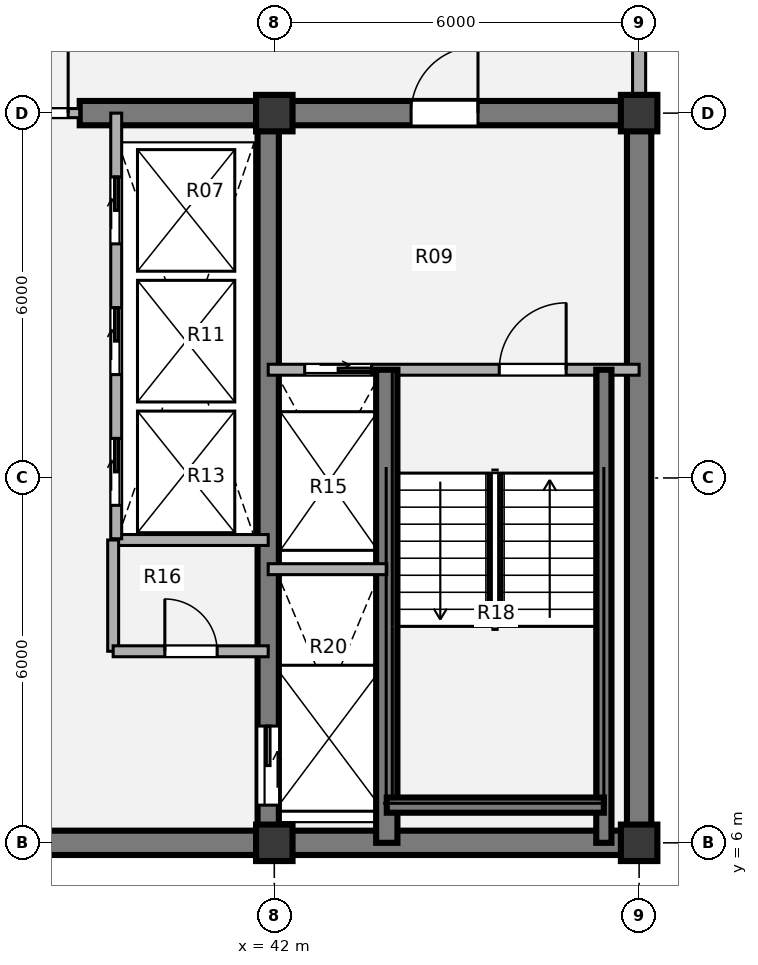
"""IFC4 building model, lengths in metres.
Left out: names, types, materials, properties, quantities, classifications, styles, units other than length and angle.
Written with IfcOpenShell. Run it as: python <this file> out.ifc"""

import sys

from ifc_helpers import new_model, si_unit, direction, frame, frame_2d, origin, origin_2d, place, context, subcontext, project, spatial, rectangle, extrude, source, transform, mapped, element, fill, save


model = new_model("IFC4")
c1 = context("Model", 3, precision=1e-05, world=origin(), true_north=direction((0.0, 1.0)))
c2 = subcontext(c1, "Body", "Model", "MODEL_VIEW")
j1 = project(units=[si_unit("LENGTHUNIT", "METRE"), si_unit("PLANEANGLEUNIT", "RADIAN")], contexts=[c1])
p1 = place(None, origin())
s1 = spatial("IfcSite", under=j1, at=p1, CompositionType="ELEMENT")
p2 = place(p1, origin())
s2 = spatial("IfcBuilding", under=s1, at=p2, CompositionType="ELEMENT")
p3 = place(p2, frame((0.0, 0.0, 287.28)))
s3 = spatial("IfcBuildingStorey", under=s2, at=p3, CompositionType="ELEMENT", Elevation=287.28)
m1 = source(origin(), c2, "Body", "SweptSolid", [
    extrude(rectangle(XDim=0.6, YDim=0.6, at=origin_2d()), origin(), (0.0, 0.0, 1.0), 3.78),
])
for number, where, z_axis, x_axis in (
    (1, (42.0, 6.0, 0.0), (0.0, 0.0, 1.0), (1.0, 0.0, 0.0)),
    (2, (48.0, 6.0, 0.0), (0.0, 0.0, 1.0), (1.0, 0.0, 0.0)),
    (3, (42.0, 18.0, 0.0), (0.0, 0.0, 1.0), (1.0, 0.0, 0.0)),
    (4, (48.0, 18.0, 0.0), (0.0, 0.0, 1.0), (1.0, 0.0, 0.0)),
):
    element("IfcColumn", number, at=place(p3, frame(where, z_axis=z_axis, x_axis=x_axis)), inside=s3, PredefinedType="COLUMN", context=c2, shape_type="MappedRepresentation", body=[
        mapped(m1, transform((0.0, 0.0, 0.0), x_axis=(1.0, 0.0, 0.0), y_axis=(0.0, 1.0, 0.0), z_axis=(0.0, 0.0, 1.0), scale=1.0)),
    ])
p4 = place(p3, frame((48.2, 6.0, 0.0), z_axis=(0.0, 0.0, 1.0), x_axis=(-1.0, 0.0, 0.0)))
e5 = element("IfcWall", 5, at=p4, inside=s3, PredefinedType="SHEAR", context=c2, shape_type="SweptSolid", body=[
    extrude(rectangle(XDim=24.4, YDim=0.4, at=frame_2d((12.2, 0.0))), origin(), (0.0, 0.0, 1.0), 3.78),
])
p5 = place(p3, frame((48.0, 18.0, 0.0), z_axis=(0.0, 0.0, 1.0), x_axis=(0.0, -1.0, 0.0)))
e6 = element("IfcWall", 6, at=p5, inside=s3, PredefinedType="SHEAR", context=c2, shape_type="SweptSolid", body=[
    extrude(rectangle(XDim=12.0, YDim=0.4, at=frame_2d((6.0, 0.0))), origin(), (0.0, 0.0, 1.0), 3.78),
])
p6 = place(p3, frame((38.8, 18.0, 0.0), z_axis=(0.0, 0.0, 1.0), x_axis=(1.0, 0.0, 0.0)))
e7 = element("IfcWall", 7, at=p6, inside=s3, PredefinedType="SHEAR", context=c2, shape_type="SweptSolid", body=[
    extrude(rectangle(XDim=9.4, YDim=0.4, at=frame_2d((4.7, 0.0))), origin(), (0.0, 0.0, 1.0), 3.78),
])
p7 = place(p6, frame((5.45, 0.0, 0.0)))
e8 = element("IfcOpeningElement", 8, at=p7, cuts=e7, PredefinedType="OPENING", context=c2, shape_type="SweptSolid", body=[
    extrude(rectangle(XDim=1.1, YDim=2.1, at=origin_2d()), frame((0.55, 0.21, 1.05), z_axis=(0.0, -1.0, 0.0), x_axis=(1.0, 0.0, 0.0)), (0.0, 0.0, 1.0), 0.42),
])
p8 = place(p3, frame((41.9, 18.0, 0.0), z_axis=(0.0, 0.0, 1.0), x_axis=(0.0, -1.0, 0.0)))
e9 = element("IfcWall", 9, at=p8, inside=s3, PredefinedType="SHEAR", context=c2, shape_type="SweptSolid", body=[
    extrude(rectangle(XDim=12.0, YDim=0.35, at=frame_2d((6.0, 0.0))), origin(), (0.0, 0.0, 1.0), 3.78),
])
p9 = place(p8, frame((10.08, 0.0, 0.0)))
e10 = element("IfcOpeningElement", 10, at=p9, cuts=e9, PredefinedType="OPENING", context=c2, shape_type="SweptSolid", body=[
    extrude(rectangle(XDim=1.3, YDim=2.1, at=origin_2d()), frame((0.65, 0.185, 1.05), z_axis=(0.0, -1.0, 0.0), x_axis=(1.0, 0.0, 0.0)), (0.0, 0.0, 1.0), 0.37),
])
p10 = place(p3, frame((48.0, 21.05, 0.0), z_axis=(0.0, 0.0, 1.0), x_axis=(0.0, -1.0, 0.0)))
e11 = element("IfcWall", 11, at=p10, inside=s3, PredefinedType="SOLIDWALL", context=c2, shape_type="SweptSolid", body=[
    extrude(rectangle(XDim=2.77, YDim=0.215, at=frame_2d((1.385, 0.0))), origin(), (0.0, 0.0, 1.0), 2.648),
])
p11 = place(p3, frame((39.35, 10.98, 0.0), z_axis=(0.0, 0.0, 1.0), x_axis=(1.0, 0.0, 0.0)))
e12 = element("IfcWall", 12, at=p11, inside=s3, PredefinedType="PARTITIONING", context=c2, shape_type="SweptSolid", body=[
    extrude(rectangle(XDim=2.55, YDim=0.18, at=frame_2d((1.275, 0.0))), origin(), (0.0, 0.0, 1.0), 3.43),
])
p12 = place(p3, frame((39.35, 9.15, 0.0), z_axis=(0.0, 0.0, 1.0), x_axis=(0.0, 1.0, 0.0)))
e13 = element("IfcWall", 13, at=p12, inside=s3, PredefinedType="PARTITIONING", context=c2, shape_type="SweptSolid", body=[
    extrude(rectangle(XDim=1.83, YDim=0.18, at=frame_2d((0.915, 0.0))), origin(), (0.0, 0.0, 1.0), 3.43),
])
p13 = place(p3, frame((39.35, 9.15, 0.0), z_axis=(0.0, 0.0, 1.0), x_axis=(1.0, 0.0, 0.0)))
e14 = element("IfcWall", 14, at=p13, inside=s3, PredefinedType="PARTITIONING", context=c2, shape_type="SweptSolid", body=[
    extrude(rectangle(XDim=2.55, YDim=0.18, at=frame_2d((1.275, 0.0))), origin(), (0.0, 0.0, 1.0), 3.43),
])
p14 = place(p13, frame((0.85, 0.0, 0.0)))
e15 = element("IfcOpeningElement", 15, at=p14, cuts=e14, PredefinedType="OPENING", context=c2, shape_type="SweptSolid", body=[
    extrude(rectangle(XDim=0.86, YDim=2.1, at=origin_2d()), frame((0.43, 0.1, 1.05), z_axis=(0.0, -1.0, 0.0), x_axis=(1.0, 0.0, 0.0)), (0.0, 0.0, 1.0), 0.2),
])
p15 = place(p3, frame((33.2, 18.0, 0.0), z_axis=(0.0, 0.0, 1.0), x_axis=(1.0, 0.0, 0.0)))
e16 = element("IfcWall", 16, at=p15, inside=s3, PredefinedType="PARTITIONING", context=c2, shape_type="SweptSolid", body=[
    extrude(rectangle(XDim=5.6, YDim=0.15, at=frame_2d((2.8, 0.0))), origin(), (0.0, 0.0, 1.0), 2.445),
])
p16 = place(p15, frame((0.19, 0.0, 0.0)))
e17 = element("IfcOpeningElement", 17, at=p16, cuts=e16, PredefinedType="OPENING", context=c2, shape_type="SweptSolid", body=[
    extrude(rectangle(XDim=1.1, YDim=2.1, at=origin_2d()), frame((0.55, 0.085, 1.05), z_axis=(0.0, -1.0, 0.0), x_axis=(1.0, 0.0, 0.0)), (0.0, 0.0, 1.0), 0.17),
])
p17 = place(p15, frame((4.31, 0.0, 0.0)))
e18 = element("IfcOpeningElement", 18, at=p17, cuts=e16, PredefinedType="OPENING", context=c2, shape_type="SweptSolid", body=[
    extrude(rectangle(XDim=1.1, YDim=2.1, at=origin_2d()), frame((0.55, 0.085, 1.05), z_axis=(0.0, -1.0, 0.0), x_axis=(1.0, 0.0, 0.0)), (0.0, 0.0, 1.0), 0.17),
])
p18 = place(p3, frame((41.9, 13.78, 0.0), z_axis=(0.0, 0.0, 1.0), x_axis=(1.0, 0.0, 0.0)))
e19 = element("IfcWall", 19, at=p18, inside=s3, PredefinedType="PARTITIONING", context=c2, shape_type="SweptSolid", body=[
    extrude(rectangle(XDim=6.1, YDim=0.18, at=frame_2d((3.05, 0.0))), origin(), (0.0, 0.0, 1.0), 3.43),
])
p19 = place(p18, frame((0.6, 0.0, 0.0)))
e20 = element("IfcOpeningElement", 20, at=p19, cuts=e19, PredefinedType="OPENING", context=c2, shape_type="SweptSolid", body=[
    extrude(rectangle(XDim=1.1, YDim=2.1, at=origin_2d()), frame((0.55, 0.1, 1.05), z_axis=(0.0, -1.0, 0.0), x_axis=(1.0, 0.0, 0.0)), (0.0, 0.0, 1.0), 0.2),
])
p20 = place(p18, frame((3.8, 0.0, 0.0)))
e21 = element("IfcOpeningElement", 21, at=p20, cuts=e19, PredefinedType="OPENING", context=c2, shape_type="SweptSolid", body=[
    extrude(rectangle(XDim=1.1, YDim=2.1, at=origin_2d()), frame((0.55, 0.1, 1.05), z_axis=(0.0, -1.0, 0.0), x_axis=(1.0, 0.0, 0.0)), (0.0, 0.0, 1.0), 0.2),
])
p21 = place(p3, frame((43.85, 6.0, 0.0), z_axis=(0.0, 0.0, 1.0), x_axis=(0.0, 1.0, 0.0)))
e22 = element("IfcWall", 22, at=p21, inside=s3, PredefinedType="SHEAR", context=c2, shape_type="SweptSolid", body=[
    extrude(rectangle(XDim=7.78, YDim=0.35, at=frame_2d((3.89, 0.0))), origin(), (0.0, 0.0, 1.0), 3.78),
])
p22 = place(p3, frame((47.42, 6.0, 0.0), z_axis=(0.0, 0.0, 1.0), x_axis=(0.0, 1.0, 0.0)))
e23 = element("IfcWall", 23, at=p22, inside=s3, PredefinedType="SHEAR", context=c2, shape_type="SweptSolid", body=[
    extrude(rectangle(XDim=7.78, YDim=0.25, at=frame_2d((3.89, 0.0))), origin(), (0.0, 0.0, 1.0), 3.78),
])
p23 = place(p3, frame((43.85, 6.62, 0.0), z_axis=(0.0, 0.0, 1.0), x_axis=(1.0, 0.0, 0.0)))
e24 = element("IfcWall", 24, at=p23, inside=s3, PredefinedType="SHEAR", context=c2, shape_type="SweptSolid", body=[
    extrude(rectangle(XDim=3.57, YDim=0.25, at=frame_2d((1.785, 0.0))), origin(), (0.0, 0.0, 1.0), 3.78),
])
p24 = place(p3, frame((41.9, 10.5, 0.0), z_axis=(0.0, 0.0, 1.0), x_axis=(1.0, 0.0, 0.0)))
e25 = element("IfcWall", 25, at=p24, inside=s3, PredefinedType="PARTITIONING", context=c2, shape_type="SweptSolid", body=[
    extrude(rectangle(XDim=1.95, YDim=0.18, at=frame_2d((0.975, 0.0))), origin(), (0.0, 0.0, 1.0), 3.43),
])
p25 = place(p3, frame((39.4, 11.0, 0.0), z_axis=(0.0, 0.0, 1.0), x_axis=(0.0, 1.0, 0.0)))
e26 = element("IfcWall", 26, at=p25, inside=s3, PredefinedType="PARTITIONING", context=c2, shape_type="SweptSolid", body=[
    extrude(rectangle(XDim=7.0, YDim=0.18, at=frame_2d((3.5, 0.0))), origin(), (0.0, 0.0, 1.0), 3.43),
])
p26 = place(p25, frame((0.55, 0.0, 0.0)))
e27 = element("IfcOpeningElement", 27, at=p26, cuts=e26, PredefinedType="OPENING", context=c2, shape_type="SweptSolid", body=[
    extrude(rectangle(XDim=1.1, YDim=2.1, at=origin_2d()), frame((0.55, 0.1, 1.05), z_axis=(0.0, -1.0, 0.0), x_axis=(1.0, 0.0, 0.0)), (0.0, 0.0, 1.0), 0.2),
])
p27 = place(p25, frame((2.7, 0.0, 0.0)))
e28 = element("IfcOpeningElement", 28, at=p27, cuts=e26, PredefinedType="OPENING", context=c2, shape_type="SweptSolid", body=[
    extrude(rectangle(XDim=1.1, YDim=2.1, at=origin_2d()), frame((0.55, 0.1, 1.05), z_axis=(0.0, -1.0, 0.0), x_axis=(1.0, 0.0, 0.0)), (0.0, 0.0, 1.0), 0.2),
])
p28 = place(p25, frame((4.85, 0.0, 0.0)))
e29 = element("IfcOpeningElement", 29, at=p28, cuts=e26, PredefinedType="OPENING", context=c2, shape_type="SweptSolid", body=[
    extrude(rectangle(XDim=1.1, YDim=2.1, at=origin_2d()), frame((0.55, 0.1, 1.05), z_axis=(0.0, -1.0, 0.0), x_axis=(1.0, 0.0, 0.0)), (0.0, 0.0, 1.0), 0.2),
])
m2 = source(origin(), c2, "Body", "SweptSolid", [
    extrude(rectangle(XDim=0.86, YDim=2.1, at=origin_2d()), frame((0.43, 0.025, 1.05), z_axis=(0.0, -1.0, 0.0), x_axis=(1.0, 0.0, 0.0)), (0.0, 0.0, 1.0), 0.05),
])
p29 = place(p14, origin())
e30 = element("IfcDoor", 30, at=p29, inside=s3, OperationType="SINGLE_SWING_LEFT", PredefinedType="DOOR", context=c2, shape_type="MappedRepresentation", body=[
    mapped(m2, transform((0.0, 0.0, 0.0), x_axis=(1.0, 0.0, 0.0), y_axis=(0.0, 1.0, 0.0), z_axis=(0.0, 0.0, 1.0), scale=1.0)),
])
fill(e15, e30)
m3 = source(origin(), c2, "Body", "SweptSolid", [
    extrude(rectangle(XDim=1.1, YDim=2.1, at=origin_2d()), frame((0.55, 0.025, 1.05), z_axis=(0.0, -1.0, 0.0), x_axis=(1.0, 0.0, 0.0)), (0.0, 0.0, 1.0), 0.05),
])
p30 = place(p17, origin())
e31 = element("IfcDoor", 31, at=p30, inside=s3, OperationType="SINGLE_SWING_RIGHT", PredefinedType="DOOR", context=c2, shape_type="MappedRepresentation", body=[
    mapped(m3, transform((0.0, 0.0, 0.0), x_axis=(1.0, 0.0, 0.0), y_axis=(0.0, 1.0, 0.0), z_axis=(0.0, 0.0, 1.0), scale=1.0)),
])
fill(e18, e31)
m4 = source(origin(), c2, "Body", "SweptSolid", [
    extrude(rectangle(XDim=1.1, YDim=2.1, at=origin_2d()), frame((0.55, 0.025, 1.05), z_axis=(0.0, -1.0, 0.0), x_axis=(1.0, 0.0, 0.0)), (0.0, 0.0, 1.0), 0.05),
])
p31 = place(p19, origin())
e32 = element("IfcDoor", 32, at=p31, inside=s3, OperationType="SLIDING_TO_RIGHT", PredefinedType="DOOR", context=c2, shape_type="MappedRepresentation", body=[
    mapped(m4, transform((0.0, 0.0, 0.0), x_axis=(1.0, 0.0, 0.0), y_axis=(0.0, 1.0, 0.0), z_axis=(0.0, 0.0, 1.0), scale=1.0)),
])
fill(e20, e32)
m5 = source(origin(), c2, "Body", "SweptSolid", [
    extrude(rectangle(XDim=1.1, YDim=2.1, at=origin_2d()), frame((0.55, 0.025, 1.05), z_axis=(0.0, -1.0, 0.0), x_axis=(1.0, 0.0, 0.0)), (0.0, 0.0, 1.0), 0.05),
])
p32 = place(p20, origin())
e33 = element("IfcDoor", 33, at=p32, inside=s3, OperationType="SINGLE_SWING_RIGHT", PredefinedType="DOOR", context=c2, shape_type="MappedRepresentation", body=[
    mapped(m5, transform((0.0, 0.0, 0.0), x_axis=(1.0, 0.0, 0.0), y_axis=(0.0, 1.0, 0.0), z_axis=(0.0, 0.0, 1.0), scale=1.0)),
])
fill(e21, e33)
m6 = source(origin(), c2, "Body", "SweptSolid", [
    extrude(rectangle(XDim=1.3, YDim=2.1, at=origin_2d()), frame((0.65, 0.025, 1.05), z_axis=(0.0, -1.0, 0.0), x_axis=(1.0, 0.0, 0.0)), (0.0, 0.0, 1.0), 0.05),
])
p33 = place(p9, origin())
e34 = element("IfcDoor", 34, at=p33, inside=s3, OperationType="SLIDING_TO_LEFT", PredefinedType="DOOR", context=c2, shape_type="MappedRepresentation", body=[
    mapped(m6, transform((0.0, 0.0, 0.0), x_axis=(1.0, 0.0, 0.0), y_axis=(0.0, 1.0, 0.0), z_axis=(0.0, 0.0, 1.0), scale=1.0)),
])
fill(e10, e34)
p34 = place(p7, origin())
e35 = element("IfcDoor", 35, at=p34, inside=s3, OperationType="SINGLE_SWING_RIGHT", PredefinedType="DOOR", context=c2, shape_type="MappedRepresentation", body=[
    mapped(m3, transform((0.0, 0.0, 0.0), x_axis=(1.0, 0.0, 0.0), y_axis=(0.0, 1.0, 0.0), z_axis=(0.0, 0.0, 1.0), scale=1.0)),
])
fill(e8, e35)
p35 = place(p26, origin())
e36 = element("IfcDoor", 36, at=p35, inside=s3, OperationType="SLIDING_TO_RIGHT", PredefinedType="DOOR", context=c2, shape_type="MappedRepresentation", body=[
    mapped(m4, transform((0.0, 0.0, 0.0), x_axis=(1.0, 0.0, 0.0), y_axis=(0.0, 1.0, 0.0), z_axis=(0.0, 0.0, 1.0), scale=1.0)),
])
fill(e27, e36)
p36 = place(p27, origin())
e37 = element("IfcDoor", 37, at=p36, inside=s3, OperationType="SLIDING_TO_RIGHT", PredefinedType="DOOR", context=c2, shape_type="MappedRepresentation", body=[
    mapped(m4, transform((0.0, 0.0, 0.0), x_axis=(1.0, 0.0, 0.0), y_axis=(0.0, 1.0, 0.0), z_axis=(0.0, 0.0, 1.0), scale=1.0)),
])
fill(e28, e37)
p37 = place(p28, origin())
e38 = element("IfcDoor", 38, at=p37, inside=s3, OperationType="SLIDING_TO_RIGHT", PredefinedType="DOOR", context=c2, shape_type="MappedRepresentation", body=[
    mapped(m4, transform((0.0, 0.0, 0.0), x_axis=(1.0, 0.0, 0.0), y_axis=(0.0, 1.0, 0.0), z_axis=(0.0, 0.0, 1.0), scale=1.0)),
])
fill(e29, e38)
save(model, sys.argv[1])
